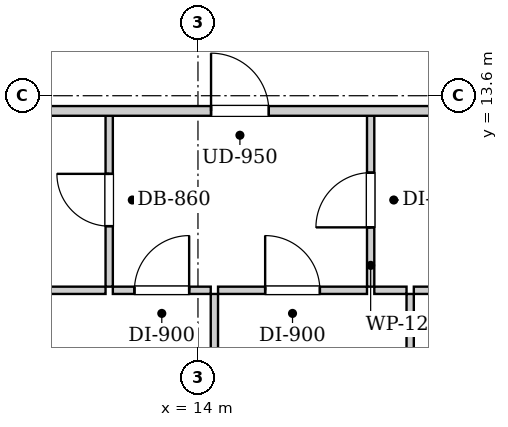
"""IFC4 building model, lengths in metres.
Left out: names, types, materials, properties, quantities, classifications, styles, units other than length and angle.
Written with IfcOpenShell. Run it as: python <this file> out.ifc"""

import sys

from ifc_helpers import new_model, si_unit, direction, frame, frame_2d, origin, place, context, subcontext, project, spatial, rectangle, extrude, element, fill, save


model = new_model("IFC4")
c1 = context("Model", 3, precision=1e-05, world=origin(), true_north=direction((0.0, 1.0)))
c2 = subcontext(c1, "Body", "Model", "MODEL_VIEW")
j1 = project(units=[si_unit("LENGTHUNIT", "METRE"), si_unit("PLANEANGLEUNIT", "RADIAN")], contexts=[c1])
p1 = place(None, origin())
s1 = spatial("IfcSite", under=j1, at=p1, CompositionType="ELEMENT")
p2 = place(p1, origin())
s2 = spatial("IfcBuilding", under=s1, at=p2, CompositionType="ELEMENT")
p3 = place(p2, frame((0.0, 0.0, 100.7)))
s3 = spatial("IfcBuildingStorey", under=s2, at=p3, CompositionType="ELEMENT", Elevation=100.7)
p4 = place(p3, frame((12.54, 10.46, 0.0), z_axis=(0.0, 0.0, 1.0), x_axis=(0.0, 1.0, 0.0)))
e1 = element("IfcWall", 1, at=p4, inside=s3, PredefinedType="PARTITIONING", context=c2, shape_type="SweptSolid", body=[
    extrude(rectangle(XDim=2.85, YDim=0.12, at=frame_2d((1.425, 0.0))), origin(), (0.0, 0.0, 1.0), 2.94),
])
p5 = place(p4, frame((0.995, 0.0, 0.0)))
e2 = element("IfcOpeningElement", 2, at=p5, cuts=e1, PredefinedType="OPENING", context=c2, shape_type="SweptSolid", body=[
    extrude(rectangle(XDim=0.86, YDim=2.05, at=frame_2d((0.43, 1.025))), frame((0.0, 0.07, 0.0), z_axis=(0.0, -1.0, 0.0), x_axis=(1.0, 0.0, 0.0)), (0.0, 0.0, 1.0), 0.14),
])
p6 = place(p3, frame((11.11, 10.4, 0.0), z_axis=(0.0, 0.0, 1.0), x_axis=(1.0, 0.0, 0.0)))
e3 = element("IfcWall", 3, at=p6, inside=s3, PredefinedType="PARTITIONING", context=c2, shape_type="SweptSolid", body=[
    extrude(rectangle(XDim=1.37, YDim=0.12, at=frame_2d((0.685, 0.0))), origin(), (0.0, 0.0, 1.0), 2.94),
])
p7 = place(p3, frame((16.84, 10.46, 0.0), z_axis=(0.0, 0.0, 1.0), x_axis=(0.0, 1.0, 0.0)))
e4 = element("IfcWall", 4, at=p7, inside=s3, PredefinedType="PARTITIONING", context=c2, shape_type="SweptSolid", body=[
    extrude(rectangle(XDim=2.85, YDim=0.12, at=frame_2d((1.425, 0.0))), origin(), (0.0, 0.0, 1.0), 2.94),
])
p8 = place(p7, frame((0.975, 0.0, 0.0)))
e5 = element("IfcOpeningElement", 5, at=p8, cuts=e4, PredefinedType="OPENING", context=c2, shape_type="SweptSolid", body=[
    extrude(rectangle(XDim=0.9, YDim=2.05, at=frame_2d((0.45, 1.025))), frame((0.0, 0.07, 0.0), z_axis=(0.0, -1.0, 0.0), x_axis=(1.0, 0.0, 0.0)), (0.0, 0.0, 1.0), 0.14),
])
p9 = place(p3, frame((12.6, 10.4, 0.0), z_axis=(0.0, 0.0, 1.0), x_axis=(1.0, 0.0, 0.0)))
e6 = element("IfcWall", 6, at=p9, inside=s3, PredefinedType="PARTITIONING", context=c2, shape_type="SweptSolid", body=[
    extrude(rectangle(XDim=1.61, YDim=0.12, at=frame_2d((0.805, 0.0))), origin(), (0.0, 0.0, 1.0), 2.94),
])
p10 = place(p9, frame((0.355, 0.0, 0.0)))
e7 = element("IfcOpeningElement", 7, at=p10, cuts=e6, PredefinedType="OPENING", context=c2, shape_type="SweptSolid", body=[
    extrude(rectangle(XDim=0.9, YDim=2.05, at=frame_2d((0.45, 1.025))), frame((0.0, 0.07, 0.0), z_axis=(0.0, -1.0, 0.0), x_axis=(1.0, 0.0, 0.0)), (0.0, 0.0, 1.0), 0.14),
])
p11 = place(p3, frame((14.33, 10.4, 0.0), z_axis=(0.0, 0.0, 1.0), x_axis=(1.0, 0.0, 0.0)))
e8 = element("IfcWall", 8, at=p11, inside=s3, PredefinedType="PARTITIONING", context=c2, shape_type="SweptSolid", body=[
    extrude(rectangle(XDim=2.45, YDim=0.12, at=frame_2d((1.225, 0.0))), origin(), (0.0, 0.0, 1.0), 2.94),
])
p12 = place(p11, frame((0.775, 0.0, 0.0)))
e9 = element("IfcOpeningElement", 9, at=p12, cuts=e8, PredefinedType="OPENING", context=c2, shape_type="SweptSolid", body=[
    extrude(rectangle(XDim=0.9, YDim=2.05, at=frame_2d((0.45, 1.025))), frame((0.0, 0.07, 0.0), z_axis=(0.0, -1.0, 0.0), x_axis=(1.0, 0.0, 0.0)), (0.0, 0.0, 1.0), 0.14),
])
p13 = place(p3, frame((16.9, 10.4, 0.0), z_axis=(0.0, 0.0, 1.0), x_axis=(1.0, 0.0, 0.0)))
e10 = element("IfcWall", 10, at=p13, inside=s3, PredefinedType="PARTITIONING", context=c2, shape_type="SweptSolid", body=[
    extrude(rectangle(XDim=0.53, YDim=0.12, at=frame_2d((0.265, 0.0))), origin(), (0.0, 0.0, 1.0), 2.94),
])
p14 = place(p3, frame((17.55, 10.4, 0.0), z_axis=(0.0, 0.0, 1.0), x_axis=(1.0, 0.0, 0.0)))
e11 = element("IfcWall", 11, at=p14, inside=s3, PredefinedType="PARTITIONING", context=c2, shape_type="SweptSolid", body=[
    extrude(rectangle(XDim=2.5, YDim=0.12, at=frame_2d((1.25, 0.0))), origin(), (0.0, 0.0, 1.0), 2.94),
])
p15 = place(p14, frame((0.8, 0.0, 0.0)))
e12 = element("IfcOpeningElement", 12, at=p15, cuts=e11, PredefinedType="OPENING", context=c2, shape_type="SweptSolid", body=[
    extrude(rectangle(XDim=0.9, YDim=2.05, at=frame_2d((0.45, 1.025))), frame((0.0, 0.07, 0.0), z_axis=(0.0, -1.0, 0.0), x_axis=(1.0, 0.0, 0.0)), (0.0, 0.0, 1.0), 0.14),
])
p16 = place(p3, frame((14.27, 2.43, 0.0), z_axis=(0.0, 0.0, 1.0), x_axis=(0.0, 1.0, 0.0)))
e13 = element("IfcWall", 13, at=p16, inside=s3, PredefinedType="PARTITIONING", context=c2, shape_type="SweptSolid", body=[
    extrude(rectangle(XDim=7.91, YDim=0.12, at=frame_2d((3.955, 0.0))), origin(), (0.0, 0.0, 1.0), 2.94),
])
p17 = place(p16, frame((3.505, 0.0, 0.0)))
e14 = element("IfcOpeningElement", 14, at=p17, cuts=e13, PredefinedType="OPENING", context=c2, shape_type="SweptSolid", body=[
    extrude(rectangle(XDim=0.9, YDim=2.05, at=frame_2d((0.45, 1.025))), frame((0.0, 0.07, 0.0), z_axis=(0.0, -1.0, 0.0), x_axis=(1.0, 0.0, 0.0)), (0.0, 0.0, 1.0), 0.14),
])
p18 = place(p3, frame((17.49, 0.28, 0.0), z_axis=(0.0, 0.0, 1.0), x_axis=(0.0, 1.0, 0.0)))
e15 = element("IfcWall", 15, at=p18, inside=s3, PredefinedType="PARTITIONING", context=c2, shape_type="SweptSolid", body=[
    extrude(rectangle(XDim=10.06, YDim=0.12, at=frame_2d((5.03, 0.0))), origin(), (0.0, 0.0, 1.0), 2.94),
])
p19 = place(p18, frame((4.565, 0.0, 0.0)))
e16 = element("IfcOpeningElement", 16, at=p19, cuts=e15, PredefinedType="OPENING", context=c2, shape_type="SweptSolid", body=[
    extrude(rectangle(XDim=0.9, YDim=2.05, at=frame_2d((0.45, 1.025))), frame((0.0, 0.07, 0.0), z_axis=(0.0, -1.0, 0.0), x_axis=(1.0, 0.0, 0.0)), (0.0, 0.0, 1.0), 0.14),
])
p20 = place(p3, frame((10.05, 13.35, 0.0), z_axis=(0.0, 0.0, 1.0), x_axis=(1.0, 0.0, 0.0)))
e17 = element("IfcWall", 17, at=p20, inside=s3, PredefinedType="PARTITIONING", context=c2, shape_type="SweptSolid", body=[
    extrude(rectangle(XDim=30.8, YDim=0.16, at=frame_2d((15.4, 0.0))), origin(), (0.0, 0.0, 1.0), 2.94),
])
p21 = place(p20, frame((4.165, 0.0, 0.0)))
e18 = element("IfcOpeningElement", 18, at=p21, cuts=e17, PredefinedType="OPENING", context=c2, shape_type="SweptSolid", body=[
    extrude(rectangle(XDim=0.95, YDim=2.1, at=frame_2d((0.475, 1.05))), frame((0.0, 0.09, 0.0), z_axis=(0.0, -1.0, 0.0), x_axis=(1.0, 0.0, 0.0)), (0.0, 0.0, 1.0), 0.18),
])
p22 = place(p5, origin())
e19 = element("IfcDoor", 19, at=p22, inside=s3, OperationType="SINGLE_SWING_RIGHT", PredefinedType="DOOR", context=c2, shape_type="SweptSolid", body=[
    extrude(rectangle(XDim=0.86, YDim=2.05, at=frame_2d((0.43, 1.025))), frame((0.0, 0.025, 0.0), z_axis=(0.0, -1.0, 0.0), x_axis=(1.0, 0.0, 0.0)), (0.0, 0.0, 1.0), 0.05),
])
fill(e2, e19)
p23 = place(p8, origin())
e20 = element("IfcDoor", 20, at=p23, inside=s3, OperationType="SINGLE_SWING_LEFT", PredefinedType="DOOR", context=c2, shape_type="SweptSolid", body=[
    extrude(rectangle(XDim=0.9, YDim=2.05, at=frame_2d((0.45, 1.025))), frame((0.0, 0.025, 0.0), z_axis=(0.0, -1.0, 0.0), x_axis=(1.0, 0.0, 0.0)), (0.0, 0.0, 1.0), 0.05),
])
fill(e5, e20)
p24 = place(p10, origin())
e21 = element("IfcDoor", 21, at=p24, inside=s3, OperationType="SINGLE_SWING_RIGHT", PredefinedType="DOOR", context=c2, shape_type="SweptSolid", body=[
    extrude(rectangle(XDim=0.9, YDim=2.05, at=frame_2d((0.45, 1.025))), frame((0.0, 0.025, 0.0), z_axis=(0.0, -1.0, 0.0), x_axis=(1.0, 0.0, 0.0)), (0.0, 0.0, 1.0), 0.05),
])
fill(e7, e21)
p25 = place(p12, origin())
e22 = element("IfcDoor", 22, at=p25, inside=s3, OperationType="SINGLE_SWING_LEFT", PredefinedType="DOOR", context=c2, shape_type="SweptSolid", body=[
    extrude(rectangle(XDim=0.9, YDim=2.05, at=frame_2d((0.45, 1.025))), frame((0.0, 0.025, 0.0), z_axis=(0.0, -1.0, 0.0), x_axis=(1.0, 0.0, 0.0)), (0.0, 0.0, 1.0), 0.05),
])
fill(e9, e22)
p26 = place(p21, origin())
e23 = element("IfcDoor", 23, at=p26, inside=s3, OperationType="SINGLE_SWING_LEFT", PredefinedType="DOOR", context=c2, shape_type="SweptSolid", body=[
    extrude(rectangle(XDim=0.95, YDim=2.1, at=frame_2d((0.475, 1.05))), frame((0.0, 0.025, 0.0), z_axis=(0.0, -1.0, 0.0), x_axis=(1.0, 0.0, 0.0)), (0.0, 0.0, 1.0), 0.05),
])
fill(e18, e23)
save(model, sys.argv[1])
